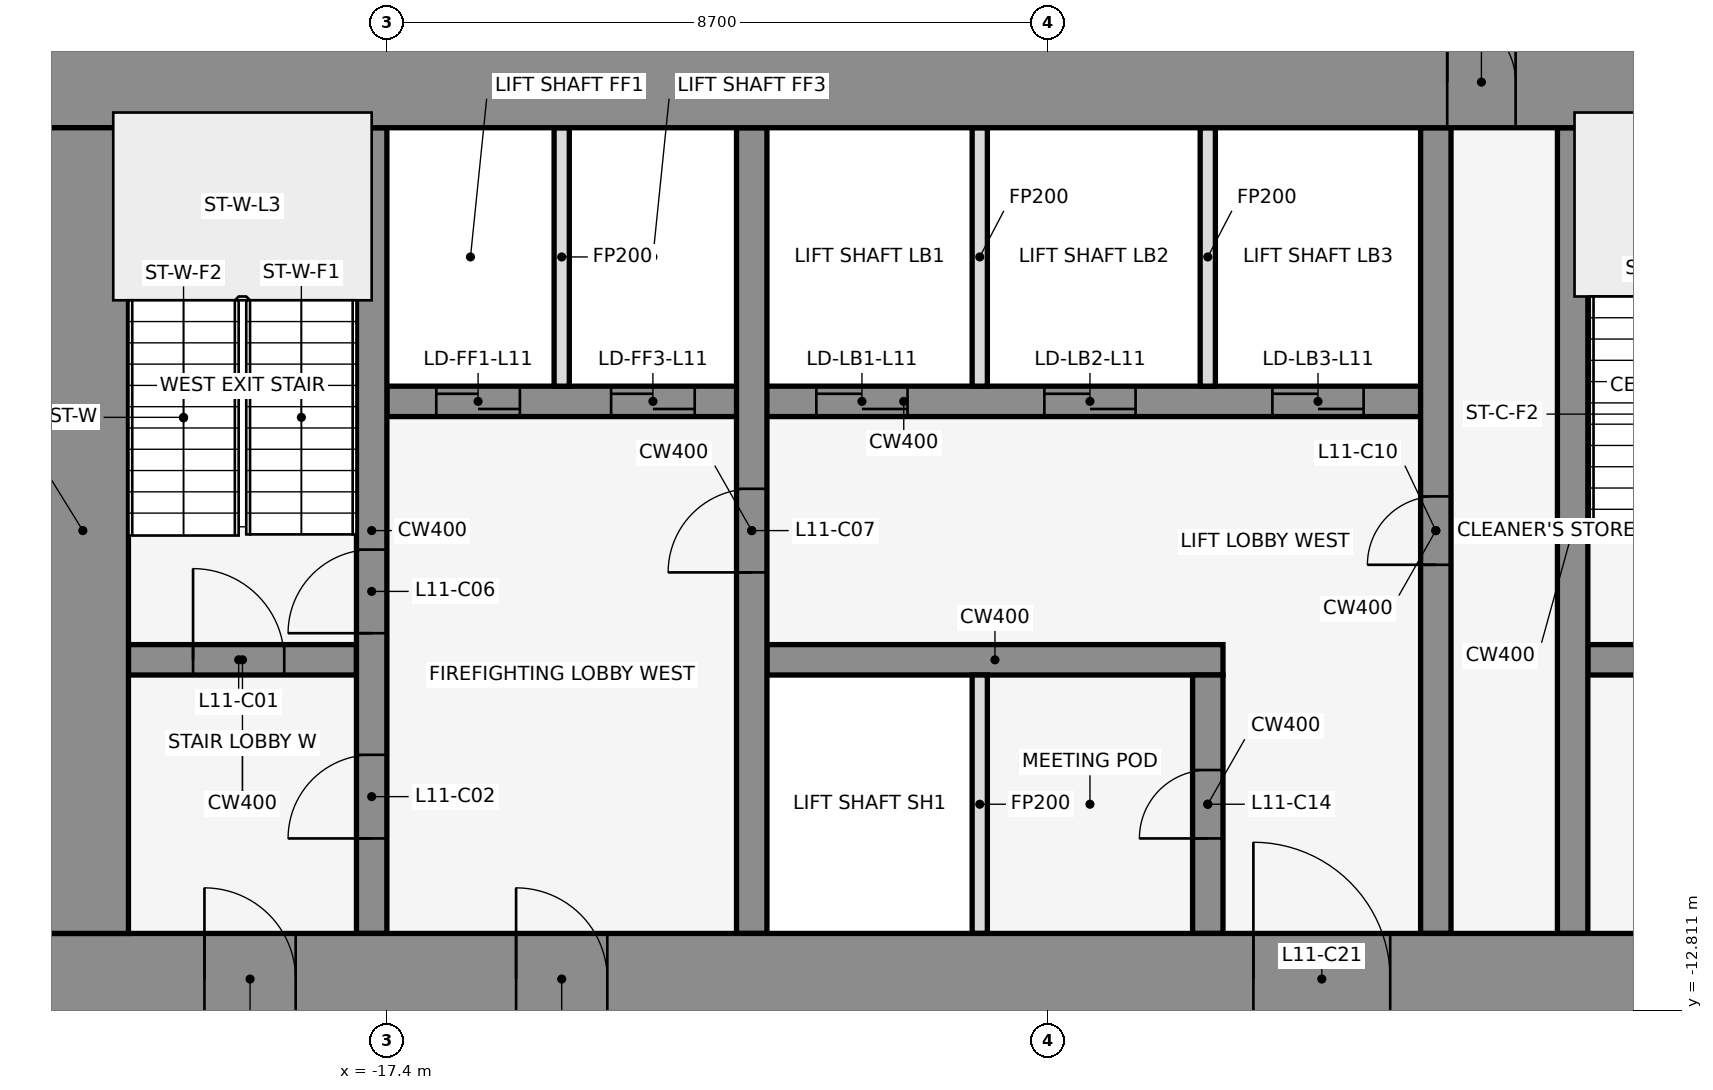
"""IFC4 building model, lengths in metres.
Left out: names, types, materials, properties, quantities, classifications, styles, units other than length and angle.
Written with IfcOpenShell. Run it as: python <this file> out.ifc"""

import sys

from ifc_helpers import new_model, si_unit, direction, frame, frame_2d, origin, place, context, subcontext, project, spatial, rectangle, extrude, element, fill, save


model = new_model("IFC4")
c1 = context("Model", 3, precision=1e-05, world=origin(), true_north=direction((0.0, 1.0)))
c2 = subcontext(c1, "Body", "Model", "MODEL_VIEW")
j1 = project(units=[si_unit("LENGTHUNIT", "METRE"), si_unit("PLANEANGLEUNIT", "RADIAN")], contexts=[c1])
p1 = place(None, origin())
s1 = spatial("IfcSite", under=j1, at=p1, CompositionType="ELEMENT")
p2 = place(p1, origin())
s2 = spatial("IfcBuilding", under=s1, at=p2, CompositionType="ELEMENT")
p3 = place(p2, frame((0.0, 0.0, 57.5)))
s3 = spatial("IfcBuildingStorey", under=s2, at=p3, CompositionType="ELEMENT", Elevation=57.5)
for number, where, z_axis, x_axis in (
    (1, (-0.068, -0.105, 0.0), (0.0, 0.0, 1.0), (-0.84, 0.543, 0.0)),
    (2, (-14.599, 1.08, 0.0), (0.0, 0.0, 1.0), (-0.84, -0.543, 0.0)),
):
    element("IfcWall", number, at=place(p3, frame(where, z_axis=z_axis, x_axis=x_axis)), inside=s3, PredefinedType="STANDARD", context=c2, shape_type="SweptSolid", body=[
        extrude(rectangle(XDim=2.183, YDim=0.25, at=frame_2d((1.091, 0.0))), origin(), (0.0, 0.0, 1.0), 4.35),
    ])
p4 = place(p3, frame((-20.8, -8.2, 0.0), z_axis=(0.0, 0.0, 1.0), x_axis=(1.0, 0.0, 0.0)))
e3 = element("IfcWall", 3, at=p4, inside=s3, PredefinedType="SHEAR", context=c2, shape_type="SweptSolid", body=[
    extrude(rectangle(XDim=3.0, YDim=0.4, at=frame_2d((1.5, 0.0))), origin(), (0.0, 0.0, 1.0), 4.5),
])
p5 = place(p4, frame((0.85, 0.0, 0.0)))
e4 = element("IfcOpeningElement", 4, at=p5, cuts=e3, PredefinedType="OPENING", context=c2, shape_type="SweptSolid", body=[
    extrude(rectangle(XDim=1.2, YDim=2.1, at=frame_2d((0.6, 1.05))), frame((0.0, 0.212, 0.0), z_axis=(0.0, -1.0, 0.0), x_axis=(1.0, 0.0, 0.0)), (0.0, 0.0, 1.0), 0.424),
])
p6 = place(p3, frame((-12.4, -8.2, 0.0), z_axis=(0.0, 0.0, 1.0), x_axis=(1.0, 0.0, 0.0)))
e5 = element("IfcWall", 5, at=p6, inside=s3, PredefinedType="SHEAR", context=c2, shape_type="SweptSolid", body=[
    extrude(rectangle(XDim=6.0, YDim=0.4, at=frame_2d((3.0, 0.0))), origin(), (0.0, 0.0, 1.0), 4.5),
])
p7 = place(p3, frame((-1.6, -8.2, 0.0), z_axis=(0.0, 0.0, 1.0), x_axis=(1.0, 0.0, 0.0)))
e6 = element("IfcWall", 6, at=p7, inside=s3, PredefinedType="SHEAR", context=c2, shape_type="SweptSolid", body=[
    extrude(rectangle(XDim=3.2, YDim=0.4, at=frame_2d((1.6, 0.0))), origin(), (0.0, 0.0, 1.0), 4.5),
])
p8 = place(p7, frame((1.05, 0.0, 0.0)))
e7 = element("IfcOpeningElement", 7, at=p8, cuts=e6, PredefinedType="OPENING", context=c2, shape_type="SweptSolid", body=[
    extrude(rectangle(XDim=1.2, YDim=2.1, at=frame_2d((0.6, 1.05))), frame((0.0, 0.212, 0.0), z_axis=(0.0, -1.0, 0.0), x_axis=(1.0, 0.0, 0.0)), (0.0, 0.0, 1.0), 0.424),
])
p9 = place(p3, frame((-17.4, -4.8, 0.0), z_axis=(0.0, 0.0, 1.0), x_axis=(1.0, 0.0, 0.0)))
e8 = element("IfcWall", 8, at=p9, inside=s3, PredefinedType="SHEAR", context=c2, shape_type="SweptSolid", body=[
    extrude(rectangle(XDim=13.6, YDim=0.4, at=frame_2d((6.8, 0.0))), origin(), (0.0, 0.0, 1.0), 4.5),
])
p10 = place(p9, frame((0.65, 0.0, 0.0)))
e9 = element("IfcOpeningElement", 9, at=p10, cuts=e8, PredefinedType="OPENING", context=c2, shape_type="SweptSolid", body=[
    extrude(rectangle(XDim=1.1, YDim=2.1, at=frame_2d((0.55, 1.05))), frame((0.0, 0.212, 0.0), z_axis=(0.0, -1.0, 0.0), x_axis=(1.0, 0.0, 0.0)), (0.0, 0.0, 1.0), 0.424),
])
p11 = place(p9, frame((2.95, 0.0, 0.0)))
e10 = element("IfcOpeningElement", 10, at=p11, cuts=e8, PredefinedType="OPENING", context=c2, shape_type="SweptSolid", body=[
    extrude(rectangle(XDim=1.1, YDim=2.1, at=frame_2d((0.55, 1.05))), frame((0.0, 0.212, 0.0), z_axis=(0.0, -1.0, 0.0), x_axis=(1.0, 0.0, 0.0)), (0.0, 0.0, 1.0), 0.424),
])
p12 = place(p9, frame((5.65, 0.0, 0.0)))
e11 = element("IfcOpeningElement", 11, at=p12, cuts=e8, PredefinedType="OPENING", context=c2, shape_type="SweptSolid", body=[
    extrude(rectangle(XDim=1.2, YDim=2.1, at=frame_2d((0.6, 1.05))), frame((0.0, 0.212, 0.0), z_axis=(0.0, -1.0, 0.0), x_axis=(1.0, 0.0, 0.0)), (0.0, 0.0, 1.0), 0.424),
])
p13 = place(p9, frame((8.65, 0.0, 0.0)))
e12 = element("IfcOpeningElement", 12, at=p13, cuts=e8, PredefinedType="OPENING", context=c2, shape_type="SweptSolid", body=[
    extrude(rectangle(XDim=1.2, YDim=2.1, at=frame_2d((0.6, 1.05))), frame((0.0, 0.212, 0.0), z_axis=(0.0, -1.0, 0.0), x_axis=(1.0, 0.0, 0.0)), (0.0, 0.0, 1.0), 0.424),
])
p14 = place(p9, frame((11.65, 0.0, 0.0)))
e13 = element("IfcOpeningElement", 13, at=p14, cuts=e8, PredefinedType="OPENING", context=c2, shape_type="SweptSolid", body=[
    extrude(rectangle(XDim=1.2, YDim=2.1, at=frame_2d((0.6, 1.05))), frame((0.0, 0.212, 0.0), z_axis=(0.0, -1.0, 0.0), x_axis=(1.0, 0.0, 0.0)), (0.0, 0.0, 1.0), 0.424),
])
p15 = place(p3, frame((-17.6, -11.8, 0.0), z_axis=(0.0, 0.0, 1.0), x_axis=(0.0, 1.0, 0.0)))
e14 = element("IfcWall", 14, at=p15, inside=s3, PredefinedType="SHEAR", context=c2, shape_type="SweptSolid", body=[
    extrude(rectangle(XDim=10.6, YDim=0.4, at=frame_2d((5.3, 0.0))), origin(), (0.0, 0.0, 1.0), 4.5),
])
p16 = place(p15, frame((1.25, 0.0, 0.0)))
e15 = element("IfcOpeningElement", 15, at=p16, cuts=e14, PredefinedType="OPENING", context=c2, shape_type="SweptSolid", body=[
    extrude(rectangle(XDim=1.1, YDim=2.1, at=frame_2d((0.55, 1.05))), frame((0.0, 0.212, 0.0), z_axis=(0.0, -1.0, 0.0), x_axis=(1.0, 0.0, 0.0)), (0.0, 0.0, 1.0), 0.424),
])
p17 = place(p15, frame((3.95, 0.0, 0.0)))
e16 = element("IfcOpeningElement", 16, at=p17, cuts=e14, PredefinedType="OPENING", context=c2, shape_type="SweptSolid", body=[
    extrude(rectangle(XDim=1.1, YDim=2.1, at=frame_2d((0.55, 1.05))), frame((0.0, 0.212, 0.0), z_axis=(0.0, -1.0, 0.0), x_axis=(1.0, 0.0, 0.0)), (0.0, 0.0, 1.0), 0.424),
])
p18 = place(p3, frame((-15.1, -4.6, 0.0), z_axis=(0.0, 0.0, 1.0), x_axis=(0.0, 1.0, 0.0)))
e17 = element("IfcWall", 17, at=p18, inside=s3, PredefinedType="PARTITIONING", context=c2, shape_type="SweptSolid", body=[
    extrude(rectangle(XDim=3.4, YDim=0.2, at=frame_2d((1.7, 0.0))), origin(), (0.0, 0.0, 1.0), 3.418),
])
p19 = place(p3, frame((-12.6, -11.8, 0.0), z_axis=(0.0, 0.0, 1.0), x_axis=(0.0, 1.0, 0.0)))
e18 = element("IfcWall", 18, at=p19, inside=s3, PredefinedType="SHEAR", context=c2, shape_type="SweptSolid", body=[
    extrude(rectangle(XDim=10.6, YDim=0.4, at=frame_2d((5.3, 0.0))), origin(), (0.0, 0.0, 1.0), 4.5),
])
p20 = place(p19, frame((4.75, 0.0, 0.0)))
e19 = element("IfcOpeningElement", 19, at=p20, cuts=e18, PredefinedType="OPENING", context=c2, shape_type="SweptSolid", body=[
    extrude(rectangle(XDim=1.1, YDim=2.1, at=frame_2d((0.55, 1.05))), frame((0.0, 0.212, 0.0), z_axis=(0.0, -1.0, 0.0), x_axis=(1.0, 0.0, 0.0)), (0.0, 0.0, 1.0), 0.424),
])
for number, where, z_axis, x_axis in (
    (20, (-9.6, -11.8, 0.0), (0.0, 0.0, 1.0), (0.0, 1.0, 0.0)),
    (21, (-9.6, -4.6, 0.0), (0.0, 0.0, 1.0), (0.0, 1.0, 0.0)),
):
    element("IfcWall", number, at=place(p3, frame(where, z_axis=z_axis, x_axis=x_axis)), inside=s3, PredefinedType="PARTITIONING", context=c2, shape_type="SweptSolid", body=[
        extrude(rectangle(XDim=3.4, YDim=0.2, at=frame_2d((1.7, 0.0))), origin(), (0.0, 0.0, 1.0), 3.418),
    ])
p21 = place(p3, frame((-6.6, -11.8, 0.0), z_axis=(0.0, 0.0, 1.0), x_axis=(0.0, 1.0, 0.0)))
e22 = element("IfcWall", 22, at=p21, inside=s3, PredefinedType="SHEAR", context=c2, shape_type="SweptSolid", body=[
    extrude(rectangle(XDim=3.4, YDim=0.4, at=frame_2d((1.7, 0.0))), origin(), (0.0, 0.0, 1.0), 4.5),
])
p22 = place(p21, frame((1.25, 0.0, 0.0)))
e23 = element("IfcOpeningElement", 23, at=p22, cuts=e22, PredefinedType="OPENING", context=c2, shape_type="SweptSolid", body=[
    extrude(rectangle(XDim=0.9, YDim=2.1, at=frame_2d((0.45, 1.05))), frame((0.0, 0.212, 0.0), z_axis=(0.0, -1.0, 0.0), x_axis=(1.0, 0.0, 0.0)), (0.0, 0.0, 1.0), 0.424),
])
p23 = place(p3, frame((-6.6, -4.6, 0.0), z_axis=(0.0, 0.0, 1.0), x_axis=(0.0, 1.0, 0.0)))
e24 = element("IfcWall", 24, at=p23, inside=s3, PredefinedType="PARTITIONING", context=c2, shape_type="SweptSolid", body=[
    extrude(rectangle(XDim=3.4, YDim=0.2, at=frame_2d((1.7, 0.0))), origin(), (0.0, 0.0, 1.0), 3.418),
])
p24 = place(p3, frame((-3.6, -11.8, 0.0), z_axis=(0.0, 0.0, 1.0), x_axis=(0.0, 1.0, 0.0)))
e25 = element("IfcWall", 25, at=p24, inside=s3, PredefinedType="SHEAR", context=c2, shape_type="SweptSolid", body=[
    extrude(rectangle(XDim=10.6, YDim=0.4, at=frame_2d((5.3, 0.0))), origin(), (0.0, 0.0, 1.0), 4.5),
])
p25 = place(p24, frame((4.85, 0.0, 0.0)))
e26 = element("IfcOpeningElement", 26, at=p25, cuts=e25, PredefinedType="OPENING", context=c2, shape_type="SweptSolid", body=[
    extrude(rectangle(XDim=0.9, YDim=2.1, at=frame_2d((0.45, 1.05))), frame((0.0, 0.212, 0.0), z_axis=(0.0, -1.0, 0.0), x_axis=(1.0, 0.0, 0.0)), (0.0, 0.0, 1.0), 0.424),
])
p26 = place(p3, frame((-1.8, -11.8, 0.0), z_axis=(0.0, 0.0, 1.0), x_axis=(0.0, 1.0, 0.0)))
e27 = element("IfcWall", 27, at=p26, inside=s3, PredefinedType="SHEAR", context=c2, shape_type="SweptSolid", body=[
    extrude(rectangle(XDim=10.6, YDim=0.4, at=frame_2d((5.3, 0.0))), origin(), (0.0, 0.0, 1.0), 4.5),
])
p27 = place(p3, frame((-22.0, -0.6, 0.0), z_axis=(0.0, 0.0, 1.0), x_axis=(1.0, 0.0, 0.0)))
e28 = element("IfcWall", 28, at=p27, inside=s3, PredefinedType="SHEAR", context=c2, shape_type="SweptSolid", body=[
    extrude(rectangle(XDim=44.0, YDim=1.2, at=frame_2d((22.0, 0.0))), origin(), (0.0, 0.0, 1.0), 4.5),
])
p28 = place(p27, frame((18.55, 0.0, 0.0)))
e29 = element("IfcOpeningElement", 29, at=p28, cuts=e28, PredefinedType="OPENING", context=c2, shape_type="SweptSolid", body=[
    extrude(rectangle(XDim=0.9, YDim=2.1, at=frame_2d((0.45, 1.05))), frame((0.0, 0.612, 0.0), z_axis=(0.0, -1.0, 0.0), x_axis=(1.0, 0.0, 0.0)), (0.0, 0.0, 1.0), 1.224),
])
p29 = place(p27, frame((24.55, 0.0, 0.0)))
e30 = element("IfcOpeningElement", 30, at=p29, cuts=e28, PredefinedType="OPENING", context=c2, shape_type="SweptSolid", body=[
    extrude(rectangle(XDim=0.9, YDim=2.1, at=frame_2d((0.45, 1.05))), frame((0.0, 0.612, 0.0), z_axis=(0.0, -1.0, 0.0), x_axis=(1.0, 0.0, 0.0)), (0.0, 0.0, 1.0), 1.224),
])
p30 = place(p3, frame((-22.0, -12.4, 0.0), z_axis=(0.0, 0.0, 1.0), x_axis=(1.0, 0.0, 0.0)))
e31 = element("IfcWall", 31, at=p30, inside=s3, PredefinedType="SHEAR", context=c2, shape_type="SweptSolid", body=[
    extrude(rectangle(XDim=44.0, YDim=1.2, at=frame_2d((22.0, 0.0))), origin(), (0.0, 0.0, 1.0), 4.5),
])
p31 = place(p30, frame((2.2, 0.0, 0.0)))
e32 = element("IfcOpeningElement", 32, at=p31, cuts=e31, PredefinedType="OPENING", context=c2, shape_type="SweptSolid", body=[
    extrude(rectangle(XDim=1.2, YDim=2.1, at=frame_2d((0.6, 1.05))), frame((0.0, 0.612, 0.0), z_axis=(0.0, -1.0, 0.0), x_axis=(1.0, 0.0, 0.0)), (0.0, 0.0, 1.0), 1.224),
])
p32 = place(p30, frame((21.4, 0.0, 0.0)))
e33 = element("IfcOpeningElement", 33, at=p32, cuts=e31, PredefinedType="OPENING", context=c2, shape_type="SweptSolid", body=[
    extrude(rectangle(XDim=1.2, YDim=2.1, at=frame_2d((0.6, 1.05))), frame((0.0, 0.612, 0.0), z_axis=(0.0, -1.0, 0.0), x_axis=(1.0, 0.0, 0.0)), (0.0, 0.0, 1.0), 1.224),
])
p33 = place(p30, frame((40.6, 0.0, 0.0)))
e34 = element("IfcOpeningElement", 34, at=p33, cuts=e31, PredefinedType="OPENING", context=c2, shape_type="SweptSolid", body=[
    extrude(rectangle(XDim=1.2, YDim=2.1, at=frame_2d((0.6, 1.05))), frame((0.0, 0.612, 0.0), z_axis=(0.0, -1.0, 0.0), x_axis=(1.0, 0.0, 0.0)), (0.0, 0.0, 1.0), 1.224),
])
p34 = place(p30, frame((16.0, 0.0, 0.0)))
e35 = element("IfcOpeningElement", 35, at=p34, cuts=e31, PredefinedType="OPENING", context=c2, shape_type="SweptSolid", body=[
    extrude(rectangle(XDim=1.8, YDim=2.1, at=frame_2d((0.9, 1.05))), frame((0.0, 0.612, 0.0), z_axis=(0.0, -1.0, 0.0), x_axis=(1.0, 0.0, 0.0)), (0.0, 0.0, 1.0), 1.224),
])
p35 = place(p30, frame((6.3, 0.0, 0.0)))
e36 = element("IfcOpeningElement", 36, at=p35, cuts=e31, PredefinedType="OPENING", context=c2, shape_type="SweptSolid", body=[
    extrude(rectangle(XDim=1.2, YDim=2.1, at=frame_2d((0.6, 1.05))), frame((0.0, 0.612, 0.0), z_axis=(0.0, -1.0, 0.0), x_axis=(1.0, 0.0, 0.0)), (0.0, 0.0, 1.0), 1.224),
])
p36 = place(p30, frame((26.2, 0.0, 0.0)))
e37 = element("IfcOpeningElement", 37, at=p36, cuts=e31, PredefinedType="OPENING", context=c2, shape_type="SweptSolid", body=[
    extrude(rectangle(XDim=1.8, YDim=2.1, at=frame_2d((0.9, 1.05))), frame((0.0, 0.612, 0.0), z_axis=(0.0, -1.0, 0.0), x_axis=(1.0, 0.0, 0.0)), (0.0, 0.0, 1.0), 1.224),
])
p37 = place(p30, frame((36.5, 0.0, 0.0)))
e38 = element("IfcOpeningElement", 38, at=p37, cuts=e31, PredefinedType="OPENING", context=c2, shape_type="SweptSolid", body=[
    extrude(rectangle(XDim=1.2, YDim=2.1, at=frame_2d((0.6, 1.05))), frame((0.0, 0.612, 0.0), z_axis=(0.0, -1.0, 0.0), x_axis=(1.0, 0.0, 0.0)), (0.0, 0.0, 1.0), 1.224),
])
p38 = place(p3, frame((-21.4, -11.8, 0.0), z_axis=(0.0, 0.0, 1.0), x_axis=(0.0, 1.0, 0.0)))
e39 = element("IfcWall", 39, at=p38, inside=s3, PredefinedType="SHEAR", context=c2, shape_type="SweptSolid", body=[
    extrude(rectangle(XDim=10.6, YDim=1.2, at=frame_2d((5.3, 0.0))), origin(), (0.0, 0.0, 1.0), 4.5),
])
p39 = place(p5, origin())
e40 = element("IfcDoor", 40, at=p39, inside=s3, OperationType="SINGLE_SWING_LEFT", PredefinedType="DOOR", context=c2, shape_type="SweptSolid", body=[
    extrude(rectangle(XDim=1.2, YDim=2.1, at=frame_2d((0.6, 1.05))), frame((0.0, 0.025, 0.0), z_axis=(0.0, -1.0, 0.0), x_axis=(1.0, 0.0, 0.0)), (0.0, 0.0, 1.0), 0.05),
])
fill(e4, e40)
p40 = place(p16, frame((1.1, 0.0, 0.0), z_axis=(0.0, 0.0, 1.0), x_axis=(-1.0, 0.0, 0.0)))
e41 = element("IfcDoor", 41, at=p40, inside=s3, OperationType="SINGLE_SWING_LEFT", PredefinedType="DOOR", context=c2, shape_type="SweptSolid", body=[
    extrude(rectangle(XDim=1.1, YDim=2.1, at=frame_2d((0.55, 1.05))), frame((0.0, 0.025, 0.0), z_axis=(0.0, -1.0, 0.0), x_axis=(1.0, 0.0, 0.0)), (0.0, 0.0, 1.0), 0.05),
])
fill(e15, e41)
p41 = place(p10, origin())
e42 = element("IfcDoor", 42, at=p41, inside=s3, OperationType="DOUBLE_DOOR_SLIDING", PredefinedType="DOOR", context=c2, shape_type="SweptSolid", body=[
    extrude(rectangle(XDim=1.1, YDim=2.1, at=frame_2d((0.55, 1.05))), frame((0.0, 0.025, 0.0), z_axis=(0.0, -1.0, 0.0), x_axis=(1.0, 0.0, 0.0)), (0.0, 0.0, 1.0), 0.05),
])
fill(e9, e42)
p42 = place(p11, origin())
e43 = element("IfcDoor", 43, at=p42, inside=s3, OperationType="DOUBLE_DOOR_SLIDING", PredefinedType="DOOR", context=c2, shape_type="SweptSolid", body=[
    extrude(rectangle(XDim=1.1, YDim=2.1, at=frame_2d((0.55, 1.05))), frame((0.0, 0.025, 0.0), z_axis=(0.0, -1.0, 0.0), x_axis=(1.0, 0.0, 0.0)), (0.0, 0.0, 1.0), 0.05),
])
fill(e10, e43)
p43 = place(p12, origin())
e44 = element("IfcDoor", 44, at=p43, inside=s3, OperationType="DOUBLE_DOOR_SLIDING", PredefinedType="DOOR", context=c2, shape_type="SweptSolid", body=[
    extrude(rectangle(XDim=1.2, YDim=2.1, at=frame_2d((0.6, 1.05))), frame((0.0, 0.025, 0.0), z_axis=(0.0, -1.0, 0.0), x_axis=(1.0, 0.0, 0.0)), (0.0, 0.0, 1.0), 0.05),
])
fill(e11, e44)
p44 = place(p13, origin())
e45 = element("IfcDoor", 45, at=p44, inside=s3, OperationType="DOUBLE_DOOR_SLIDING", PredefinedType="DOOR", context=c2, shape_type="SweptSolid", body=[
    extrude(rectangle(XDim=1.2, YDim=2.1, at=frame_2d((0.6, 1.05))), frame((0.0, 0.025, 0.0), z_axis=(0.0, -1.0, 0.0), x_axis=(1.0, 0.0, 0.0)), (0.0, 0.0, 1.0), 0.05),
])
fill(e12, e45)
p45 = place(p14, origin())
e46 = element("IfcDoor", 46, at=p45, inside=s3, OperationType="DOUBLE_DOOR_SLIDING", PredefinedType="DOOR", context=c2, shape_type="SweptSolid", body=[
    extrude(rectangle(XDim=1.2, YDim=2.1, at=frame_2d((0.6, 1.05))), frame((0.0, 0.025, 0.0), z_axis=(0.0, -1.0, 0.0), x_axis=(1.0, 0.0, 0.0)), (0.0, 0.0, 1.0), 0.05),
])
fill(e13, e46)
p46 = place(p17, frame((1.1, 0.0, 0.0), z_axis=(0.0, 0.0, 1.0), x_axis=(-1.0, 0.0, 0.0)))
e47 = element("IfcDoor", 47, at=p46, inside=s3, OperationType="SINGLE_SWING_LEFT", PredefinedType="DOOR", context=c2, shape_type="SweptSolid", body=[
    extrude(rectangle(XDim=1.1, YDim=2.1, at=frame_2d((0.55, 1.05))), frame((0.0, 0.025, 0.0), z_axis=(0.0, -1.0, 0.0), x_axis=(1.0, 0.0, 0.0)), (0.0, 0.0, 1.0), 0.05),
])
fill(e16, e47)
p47 = place(p20, origin())
e48 = element("IfcDoor", 48, at=p47, inside=s3, OperationType="SINGLE_SWING_LEFT", PredefinedType="DOOR", context=c2, shape_type="SweptSolid", body=[
    extrude(rectangle(XDim=1.1, YDim=2.1, at=frame_2d((0.55, 1.05))), frame((0.0, 0.025, 0.0), z_axis=(0.0, -1.0, 0.0), x_axis=(1.0, 0.0, 0.0)), (0.0, 0.0, 1.0), 0.05),
])
fill(e19, e48)
p48 = place(p25, frame((0.9, 0.0, 0.0), z_axis=(0.0, 0.0, 1.0), x_axis=(-1.0, 0.0, 0.0)))
e49 = element("IfcDoor", 49, at=p48, inside=s3, OperationType="SINGLE_SWING_LEFT", PredefinedType="DOOR", context=c2, shape_type="SweptSolid", body=[
    extrude(rectangle(XDim=0.9, YDim=2.1, at=frame_2d((0.45, 1.05))), frame((0.0, 0.025, 0.0), z_axis=(0.0, -1.0, 0.0), x_axis=(1.0, 0.0, 0.0)), (0.0, 0.0, 1.0), 0.05),
])
fill(e26, e49)
p49 = place(p22, origin())
e50 = element("IfcDoor", 50, at=p49, inside=s3, OperationType="SINGLE_SWING_RIGHT", PredefinedType="DOOR", context=c2, shape_type="SweptSolid", body=[
    extrude(rectangle(XDim=0.9, YDim=2.1, at=frame_2d((0.45, 1.05))), frame((0.0, 0.025, 0.0), z_axis=(0.0, -1.0, 0.0), x_axis=(1.0, 0.0, 0.0)), (0.0, 0.0, 1.0), 0.05),
])
fill(e23, e50)
p50 = place(p28, origin())
e51 = element("IfcDoor", 51, at=p50, inside=s3, OperationType="SINGLE_SWING_LEFT", PredefinedType="DOOR", context=c2, shape_type="SweptSolid", body=[
    extrude(rectangle(XDim=0.9, YDim=2.1, at=frame_2d((0.45, 1.05))), frame((0.0, 0.025, 0.0), z_axis=(0.0, -1.0, 0.0), x_axis=(1.0, 0.0, 0.0)), (0.0, 0.0, 1.0), 0.05),
])
fill(e29, e51)
p51 = place(p31, frame((1.2, 0.0, 0.0), z_axis=(0.0, 0.0, 1.0), x_axis=(-1.0, 0.0, 0.0)))
e52 = element("IfcDoor", 52, at=p51, inside=s3, OperationType="SINGLE_SWING_RIGHT", PredefinedType="DOOR", context=c2, shape_type="SweptSolid", body=[
    extrude(rectangle(XDim=1.2, YDim=2.1, at=frame_2d((0.6, 1.05))), frame((0.0, 0.025, 0.0), z_axis=(0.0, -1.0, 0.0), x_axis=(1.0, 0.0, 0.0)), (0.0, 0.0, 1.0), 0.05),
])
fill(e32, e52)
p52 = place(p34, origin())
e53 = element("IfcDoor", 53, at=p52, inside=s3, OperationType="SINGLE_SWING_LEFT", PredefinedType="DOOR", context=c2, shape_type="SweptSolid", body=[
    extrude(rectangle(XDim=1.8, YDim=2.1, at=frame_2d((0.9, 1.05))), frame((0.0, 0.025, 0.0), z_axis=(0.0, -1.0, 0.0), x_axis=(1.0, 0.0, 0.0)), (0.0, 0.0, 1.0), 0.05),
])
fill(e35, e53)
p53 = place(p35, frame((1.2, 0.0, 0.0), z_axis=(0.0, 0.0, 1.0), x_axis=(-1.0, 0.0, 0.0)))
e54 = element("IfcDoor", 54, at=p53, inside=s3, OperationType="SINGLE_SWING_RIGHT", PredefinedType="DOOR", context=c2, shape_type="SweptSolid", body=[
    extrude(rectangle(XDim=1.2, YDim=2.1, at=frame_2d((0.6, 1.05))), frame((0.0, 0.025, 0.0), z_axis=(0.0, -1.0, 0.0), x_axis=(1.0, 0.0, 0.0)), (0.0, 0.0, 1.0), 0.05),
])
fill(e36, e54)
save(model, sys.argv[1])
